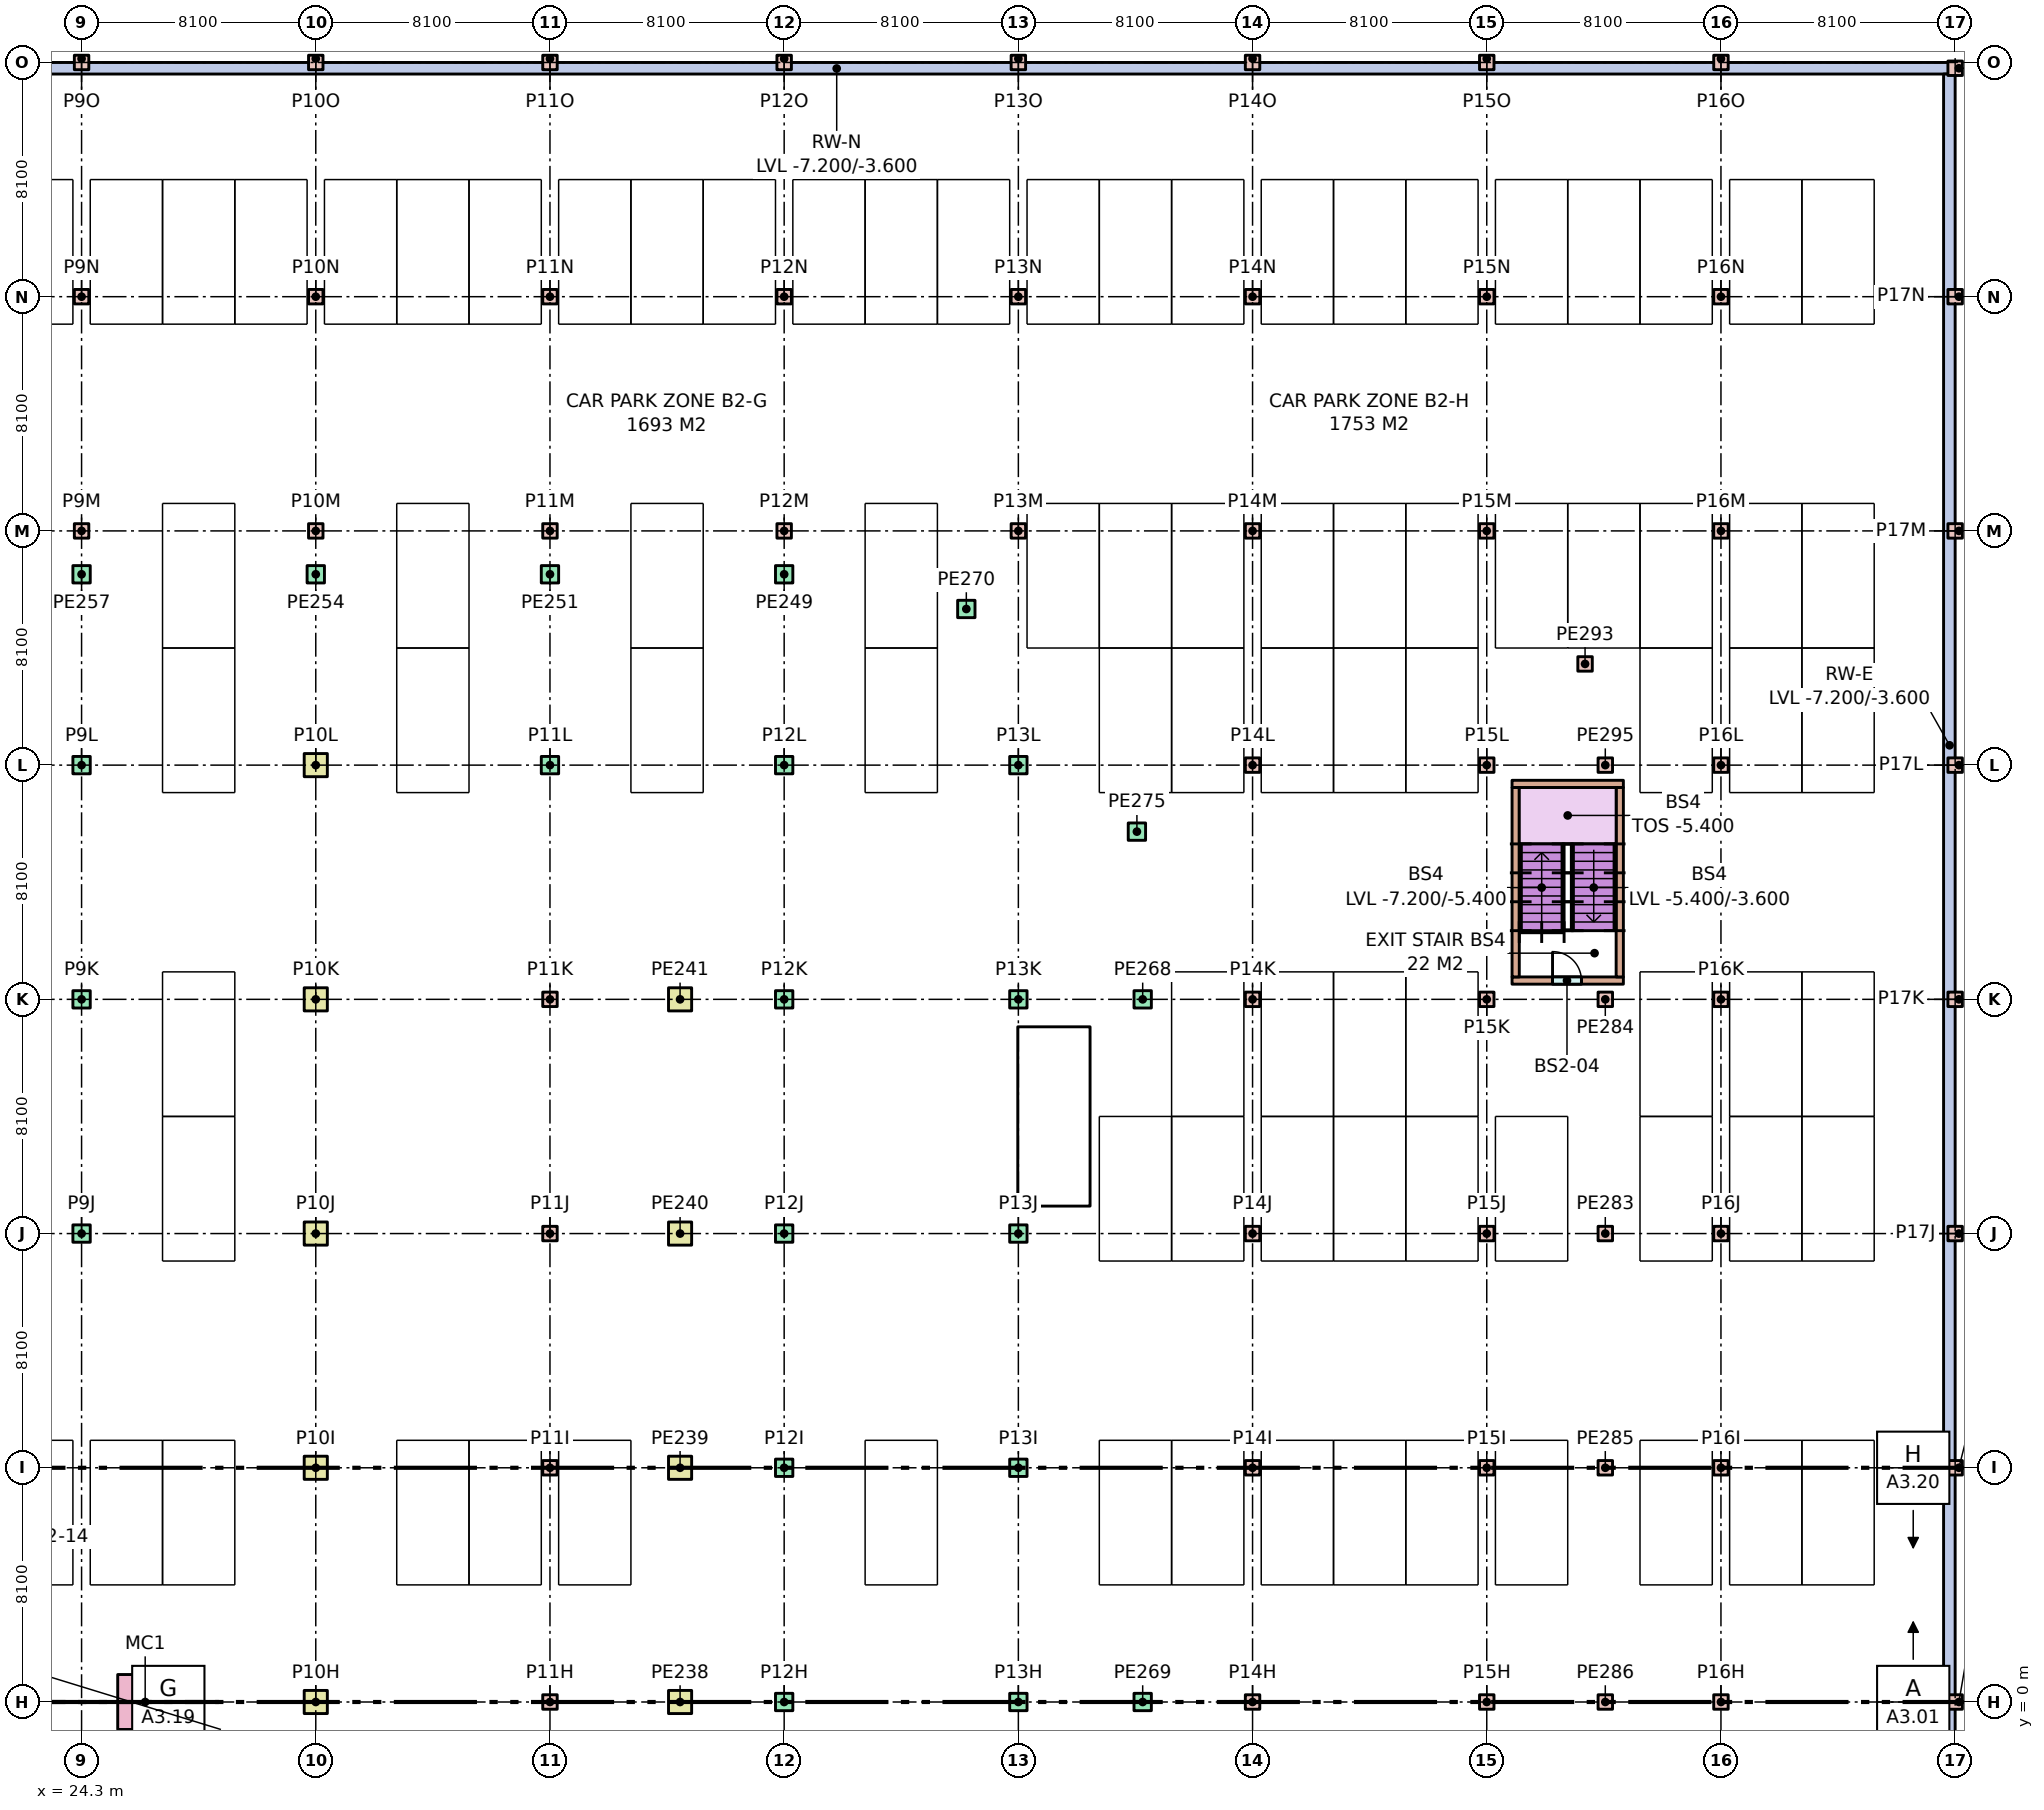
"""IFC4 building model, lengths in metres.
Left out: names, types, materials, properties, quantities, classifications, styles, units other than length and angle.
Written with IfcOpenShell. Run it as: python <this file> out.ifc"""

import sys

from ifc_helpers import new_model, si_unit, direction, frame, frame_2d, origin, origin_2d, place, context, subcontext, project, spatial, rectangle, extrude, element, fill, save


model = new_model("IFC4")
c1 = context("Model", 3, precision=1e-05, world=origin(), true_north=direction((0.0, 1.0)))
c2 = subcontext(c1, "Body", "Model", "MODEL_VIEW")
j1 = project(units=[si_unit("LENGTHUNIT", "METRE"), si_unit("PLANEANGLEUNIT", "RADIAN")], contexts=[c1])
p1 = place(None, origin())
s1 = spatial("IfcSite", under=j1, at=p1, CompositionType="ELEMENT")
p2 = place(p1, origin())
s2 = spatial("IfcBuilding", under=s1, at=p2, CompositionType="ELEMENT")
p3 = place(p2, frame((0.0, 0.0, -7.2)))
s3 = spatial("IfcBuildingStorey", under=s2, at=p3, CompositionType="ELEMENT", Elevation=-7.2)
p4 = place(p3, frame((-40.5, 56.5, 0.0), z_axis=(0.0, 0.0, 1.0), x_axis=(1.0, 0.0, 0.0)))
e1 = element("IfcWall", 1, at=p4, inside=s3, PredefinedType="SOLIDWALL", context=c2, shape_type="SweptSolid", body=[
    extrude(rectangle(XDim=129.6, YDim=0.4, at=frame_2d((64.8, 0.0))), origin(), (0.0, 0.0, 1.0), 3.6),
])
p5 = place(p3, frame((88.9, -56.3, 0.0), z_axis=(0.0, 0.0, 1.0), x_axis=(0.0, 1.0, 0.0)))
e2 = element("IfcWall", 2, at=p5, inside=s3, PredefinedType="SOLIDWALL", context=c2, shape_type="SweptSolid", body=[
    extrude(rectangle(XDim=112.6, YDim=0.4, at=frame_2d((56.3, 0.0))), origin(), (0.0, 0.0, 1.0), 3.6),
])
for number, where, z_axis, x_axis in (
    (3, (24.3, 16.2, 0.0), (0.0, 0.0, 1.0), (1.0, 0.0, 0.0)),
    (4, (24.3, 24.3, 0.0), (0.0, 0.0, 1.0), (1.0, 0.0, 0.0)),
    (5, (24.3, 32.4, 0.0), (0.0, 0.0, 1.0), (1.0, 0.0, 0.0)),
):
    element("IfcColumn", number, at=place(p3, frame(where, z_axis=z_axis, x_axis=x_axis)), inside=s3, PredefinedType="COLUMN", context=c2, shape_type="SweptSolid", body=[
        extrude(rectangle(XDim=0.6, YDim=0.6, at=origin_2d()), origin(), (0.0, 0.0, 1.0), 3.6),
    ])
for number, where, z_axis, x_axis in (
    (6, (24.3, 40.5, 0.0), (0.0, 0.0, 1.0), (1.0, 0.0, 0.0)),
    (7, (24.3, 48.6, 0.0), (0.0, 0.0, 1.0), (1.0, 0.0, 0.0)),
    (8, (24.3, 56.7, 0.0), (0.0, 0.0, 1.0), (1.0, 0.0, 0.0)),
):
    element("IfcColumn", number, at=place(p3, frame(where, z_axis=z_axis, x_axis=x_axis)), inside=s3, PredefinedType="COLUMN", context=c2, shape_type="SweptSolid", body=[
        extrude(rectangle(XDim=0.5, YDim=0.5, at=origin_2d()), origin(), (0.0, 0.0, 1.0), 3.6),
    ])
for number, where, z_axis, x_axis in (
    (9, (32.4, 0.0, 0.0), (0.0, 0.0, 1.0), (1.0, 0.0, 0.0)),
    (10, (32.4, 8.1, 0.0), (0.0, 0.0, 1.0), (1.0, 0.0, 0.0)),
    (11, (32.4, 16.2, 0.0), (0.0, 0.0, 1.0), (1.0, 0.0, 0.0)),
    (12, (32.4, 24.3, 0.0), (0.0, 0.0, 1.0), (1.0, 0.0, 0.0)),
    (13, (32.4, 32.4, 0.0), (0.0, 0.0, 1.0), (1.0, 0.0, 0.0)),
):
    element("IfcColumn", number, at=place(p3, frame(where, z_axis=z_axis, x_axis=x_axis)), inside=s3, PredefinedType="COLUMN", context=c2, shape_type="SweptSolid", body=[
        extrude(rectangle(XDim=0.8, YDim=0.8, at=origin_2d()), origin(), (0.0, 0.0, 1.0), 3.6),
    ])
for number, where, z_axis, x_axis in (
    (14, (32.4, 40.5, 0.0), (0.0, 0.0, 1.0), (1.0, 0.0, 0.0)),
    (15, (32.4, 48.6, 0.0), (0.0, 0.0, 1.0), (1.0, 0.0, 0.0)),
    (16, (32.4, 56.7, 0.0), (0.0, 0.0, 1.0), (1.0, 0.0, 0.0)),
    (17, (40.5, 0.0, 0.0), (0.0, 0.0, 1.0), (1.0, 0.0, 0.0)),
    (18, (40.5, 8.1, 0.0), (0.0, 0.0, 1.0), (1.0, 0.0, 0.0)),
    (19, (40.5, 16.2, 0.0), (0.0, 0.0, 1.0), (1.0, 0.0, 0.0)),
    (20, (40.5, 24.3, 0.0), (0.0, 0.0, 1.0), (1.0, 0.0, 0.0)),
):
    element("IfcColumn", number, at=place(p3, frame(where, z_axis=z_axis, x_axis=x_axis)), inside=s3, PredefinedType="COLUMN", context=c2, shape_type="SweptSolid", body=[
        extrude(rectangle(XDim=0.5, YDim=0.5, at=origin_2d()), origin(), (0.0, 0.0, 1.0), 3.6),
    ])
p6 = place(p3, frame((40.5, 32.4, 0.0), z_axis=(0.0, 0.0, 1.0), x_axis=(1.0, 0.0, 0.0)))
e21 = element("IfcColumn", 21, at=p6, inside=s3, PredefinedType="COLUMN", context=c2, shape_type="SweptSolid", body=[
    extrude(rectangle(XDim=0.6, YDim=0.6, at=origin_2d()), origin(), (0.0, 0.0, 1.0), 3.6),
])
for number, where, z_axis, x_axis in (
    (22, (40.5, 40.5, 0.0), (0.0, 0.0, 1.0), (1.0, 0.0, 0.0)),
    (23, (40.5, 48.6, 0.0), (0.0, 0.0, 1.0), (1.0, 0.0, 0.0)),
    (24, (40.5, 56.7, 0.0), (0.0, 0.0, 1.0), (1.0, 0.0, 0.0)),
):
    element("IfcColumn", number, at=place(p3, frame(where, z_axis=z_axis, x_axis=x_axis)), inside=s3, PredefinedType="COLUMN", context=c2, shape_type="SweptSolid", body=[
        extrude(rectangle(XDim=0.5, YDim=0.5, at=origin_2d()), origin(), (0.0, 0.0, 1.0), 3.6),
    ])
for number, where, z_axis, x_axis in (
    (25, (48.6, 0.0, 0.0), (0.0, 0.0, 1.0), (1.0, 0.0, 0.0)),
    (26, (48.6, 8.1, 0.0), (0.0, 0.0, 1.0), (1.0, 0.0, 0.0)),
    (27, (48.6, 16.2, 0.0), (0.0, 0.0, 1.0), (1.0, 0.0, 0.0)),
    (28, (48.6, 24.3, 0.0), (0.0, 0.0, 1.0), (1.0, 0.0, 0.0)),
    (29, (48.6, 32.4, 0.0), (0.0, 0.0, 1.0), (1.0, 0.0, 0.0)),
):
    element("IfcColumn", number, at=place(p3, frame(where, z_axis=z_axis, x_axis=x_axis)), inside=s3, PredefinedType="COLUMN", context=c2, shape_type="SweptSolid", body=[
        extrude(rectangle(XDim=0.6, YDim=0.6, at=origin_2d()), origin(), (0.0, 0.0, 1.0), 3.6),
    ])
for number, where, z_axis, x_axis in (
    (30, (48.6, 40.5, 0.0), (0.0, 0.0, 1.0), (1.0, 0.0, 0.0)),
    (31, (48.6, 48.6, 0.0), (0.0, 0.0, 1.0), (1.0, 0.0, 0.0)),
    (32, (48.6, 56.7, 0.0), (0.0, 0.0, 1.0), (1.0, 0.0, 0.0)),
):
    element("IfcColumn", number, at=place(p3, frame(where, z_axis=z_axis, x_axis=x_axis)), inside=s3, PredefinedType="COLUMN", context=c2, shape_type="SweptSolid", body=[
        extrude(rectangle(XDim=0.5, YDim=0.5, at=origin_2d()), origin(), (0.0, 0.0, 1.0), 3.6),
    ])
for number, where, z_axis, x_axis in (
    (33, (56.7, 0.0, 0.0), (0.0, 0.0, 1.0), (1.0, 0.0, 0.0)),
    (34, (56.7, 8.1, 0.0), (0.0, 0.0, 1.0), (1.0, 0.0, 0.0)),
    (35, (56.7, 16.2, 0.0), (0.0, 0.0, 1.0), (1.0, 0.0, 0.0)),
    (36, (56.7, 24.3, 0.0), (0.0, 0.0, 1.0), (1.0, 0.0, 0.0)),
    (37, (56.7, 32.4, 0.0), (0.0, 0.0, 1.0), (1.0, 0.0, 0.0)),
):
    element("IfcColumn", number, at=place(p3, frame(where, z_axis=z_axis, x_axis=x_axis)), inside=s3, PredefinedType="COLUMN", context=c2, shape_type="SweptSolid", body=[
        extrude(rectangle(XDim=0.6, YDim=0.6, at=origin_2d()), origin(), (0.0, 0.0, 1.0), 3.6),
    ])
for number, where, z_axis, x_axis in (
    (38, (56.7, 40.5, 0.0), (0.0, 0.0, 1.0), (1.0, 0.0, 0.0)),
    (39, (56.7, 48.6, 0.0), (0.0, 0.0, 1.0), (1.0, 0.0, 0.0)),
    (40, (56.7, 56.7, 0.0), (0.0, 0.0, 1.0), (1.0, 0.0, 0.0)),
    (41, (64.8, 0.0, 0.0), (0.0, 0.0, 1.0), (1.0, 0.0, 0.0)),
    (42, (64.8, 8.1, 0.0), (0.0, 0.0, 1.0), (1.0, 0.0, 0.0)),
    (43, (64.8, 16.2, 0.0), (0.0, 0.0, 1.0), (1.0, 0.0, 0.0)),
    (44, (64.8, 24.3, 0.0), (0.0, 0.0, 1.0), (1.0, 0.0, 0.0)),
    (45, (64.8, 32.4, 0.0), (0.0, 0.0, 1.0), (1.0, 0.0, 0.0)),
    (46, (64.8, 40.5, 0.0), (0.0, 0.0, 1.0), (1.0, 0.0, 0.0)),
    (47, (64.8, 48.6, 0.0), (0.0, 0.0, 1.0), (1.0, 0.0, 0.0)),
    (48, (64.8, 56.7, 0.0), (0.0, 0.0, 1.0), (1.0, 0.0, 0.0)),
    (49, (72.9, 0.0, 0.0), (0.0, 0.0, 1.0), (1.0, 0.0, 0.0)),
    (50, (72.9, 8.1, 0.0), (0.0, 0.0, 1.0), (1.0, 0.0, 0.0)),
    (51, (72.9, 16.2, 0.0), (0.0, 0.0, 1.0), (1.0, 0.0, 0.0)),
    (52, (72.9, 24.3, 0.0), (0.0, 0.0, 1.0), (1.0, 0.0, 0.0)),
    (53, (72.9, 32.4, 0.0), (0.0, 0.0, 1.0), (1.0, 0.0, 0.0)),
    (54, (72.9, 40.5, 0.0), (0.0, 0.0, 1.0), (1.0, 0.0, 0.0)),
    (55, (72.9, 48.6, 0.0), (0.0, 0.0, 1.0), (1.0, 0.0, 0.0)),
    (56, (72.9, 56.7, 0.0), (0.0, 0.0, 1.0), (1.0, 0.0, 0.0)),
    (57, (81.0, 0.0, 0.0), (0.0, 0.0, 1.0), (1.0, 0.0, 0.0)),
    (58, (81.0, 8.1, 0.0), (0.0, 0.0, 1.0), (1.0, 0.0, 0.0)),
    (59, (81.0, 16.2, 0.0), (0.0, 0.0, 1.0), (1.0, 0.0, 0.0)),
    (60, (81.0, 24.3, 0.0), (0.0, 0.0, 1.0), (1.0, 0.0, 0.0)),
    (61, (81.0, 32.4, 0.0), (0.0, 0.0, 1.0), (1.0, 0.0, 0.0)),
    (62, (81.0, 40.5, 0.0), (0.0, 0.0, 1.0), (1.0, 0.0, 0.0)),
    (63, (81.0, 48.6, 0.0), (0.0, 0.0, 1.0), (1.0, 0.0, 0.0)),
    (64, (81.0, 56.7, 0.0), (0.0, 0.0, 1.0), (1.0, 0.0, 0.0)),
    (65, (89.1, 0.0, 0.0), (0.0, 0.0, 1.0), (1.0, 0.0, 0.0)),
    (66, (89.1, 8.1, 0.0), (0.0, 0.0, 1.0), (1.0, 0.0, 0.0)),
    (67, (89.1, 16.2, 0.0), (0.0, 0.0, 1.0), (1.0, 0.0, 0.0)),
    (68, (89.1, 24.3, 0.0), (0.0, 0.0, 1.0), (1.0, 0.0, 0.0)),
    (69, (89.1, 32.4, 0.0), (0.0, 0.0, 1.0), (1.0, 0.0, 0.0)),
    (70, (89.1, 40.5, 0.0), (0.0, 0.0, 1.0), (1.0, 0.0, 0.0)),
    (71, (89.1, 48.6, 0.0), (0.0, 0.0, 1.0), (1.0, 0.0, 0.0)),
    (72, (89.1, 56.5, 0.0), (0.0, 0.0, 1.0), (1.0, 0.0, 0.0)),
):
    element("IfcColumn", number, at=place(p3, frame(where, z_axis=z_axis, x_axis=x_axis)), inside=s3, PredefinedType="COLUMN", context=c2, shape_type="SweptSolid", body=[
        extrude(rectangle(XDim=0.5, YDim=0.5, at=origin_2d()), origin(), (0.0, 0.0, 1.0), 3.6),
    ])
for number, where, z_axis, x_axis in (
    (73, (45.0, 0.0, 0.0), (0.0, 0.0, 1.0), (1.0, 0.0, 0.0)),
    (74, (45.0, 8.1, 0.0), (0.0, 0.0, 1.0), (1.0, 0.0, 0.0)),
    (75, (45.0, 16.2, 0.0), (0.0, 0.0, 1.0), (1.0, 0.0, 0.0)),
    (76, (45.0, 24.3, 0.0), (0.0, 0.0, 1.0), (1.0, 0.0, 0.0)),
):
    element("IfcColumn", number, at=place(p3, frame(where, z_axis=z_axis, x_axis=x_axis)), inside=s3, PredefinedType="COLUMN", context=c2, shape_type="SweptSolid", body=[
        extrude(rectangle(XDim=0.8, YDim=0.8, at=origin_2d()), origin(), (0.0, 0.0, 1.0), 3.6),
    ])
for number, where, z_axis, x_axis in (
    (77, (48.6, 39.0, 0.0), (0.0, 0.0, 1.0), (1.0, 0.0, 0.0)),
    (78, (40.5, 39.0, 0.0), (0.0, 0.0, 1.0), (1.0, 0.0, 0.0)),
    (79, (32.4, 39.0, 0.0), (0.0, 0.0, 1.0), (1.0, 0.0, 0.0)),
    (80, (24.3, 39.0, 0.0), (0.0, 0.0, 1.0), (1.0, 0.0, 0.0)),
    (81, (61.0, 24.3, 0.0), (0.0, 0.0, 1.0), (1.0, 0.0, 0.0)),
    (82, (61.0, 0.0, 0.0), (0.0, 0.0, 1.0), (1.0, 0.0, 0.0)),
    (83, (54.9, 37.8, 0.0), (0.0, 0.0, 1.0), (1.0, 0.0, 0.0)),
    (84, (60.8, 30.1, 0.0), (0.0, 0.0, 1.0), (1.0, 0.0, 0.0)),
):
    element("IfcColumn", number, at=place(p3, frame(where, z_axis=z_axis, x_axis=x_axis)), inside=s3, PredefinedType="COLUMN", context=c2, shape_type="SweptSolid", body=[
        extrude(rectangle(XDim=0.6, YDim=0.6, at=origin_2d()), origin(), (0.0, 0.0, 1.0), 3.6),
    ])
for number, where, z_axis, x_axis in (
    (85, (77.0, 16.2, 0.0), (0.0, 0.0, 1.0), (1.0, 0.0, 0.0)),
    (86, (77.0, 24.3, 0.0), (0.0, 0.0, 1.0), (1.0, 0.0, 0.0)),
    (87, (77.0, 8.1, 0.0), (0.0, 0.0, 1.0), (1.0, 0.0, 0.0)),
    (88, (77.0, 0.0, 0.0), (0.0, 0.0, 1.0), (1.0, 0.0, 0.0)),
    (89, (76.3, 35.9, 0.0), (0.0, 0.0, 1.0), (1.0, 0.0, 0.0)),
    (90, (77.0, 32.4, 0.0), (0.0, 0.0, 1.0), (1.0, 0.0, 0.0)),
):
    element("IfcColumn", number, at=place(p3, frame(where, z_axis=z_axis, x_axis=x_axis)), inside=s3, PredefinedType="COLUMN", context=c2, shape_type="SweptSolid", body=[
        extrude(rectangle(XDim=0.5, YDim=0.5, at=origin_2d()), origin(), (0.0, 0.0, 1.0), 3.6),
    ])
p7 = place(p3, frame((26.5, 0.0, 0.0), z_axis=(0.0, 0.0, 1.0), x_axis=(0.0, 1.0, 0.0)))
e91 = element("IfcColumn", 91, at=p7, inside=s3, PredefinedType="COLUMN", context=c2, shape_type="SweptSolid", body=[
    extrude(rectangle(XDim=1.9, YDim=1.9, at=origin_2d()), origin(), (0.0, 0.0, 1.0), 3.6),
])
p8 = place(p3, frame((73.775, 24.95, 0.0), z_axis=(0.0, 0.0, 1.0), x_axis=(1.0, 0.0, 0.0)))
e92 = element("IfcWall", 92, at=p8, inside=s3, PredefinedType="STANDARD", context=c2, shape_type="SweptSolid", body=[
    extrude(rectangle(XDim=3.85, YDim=0.25, at=frame_2d((1.925, 0.0))), origin(), (0.0, 0.0, 1.0), 3.28),
])
p9 = place(p8, frame((1.4, 0.0, 0.0)))
e93 = element("IfcOpeningElement", 93, at=p9, cuts=e92, PredefinedType="OPENING", context=c2, shape_type="SweptSolid", body=[
    extrude(rectangle(XDim=1.0, YDim=2.1, at=frame_2d((0.5, 1.05))), frame((0.0, 0.135, 0.0), z_axis=(0.0, -1.0, 0.0), x_axis=(1.0, 0.0, 0.0)), (0.0, 0.0, 1.0), 0.27),
])
p10 = place(p3, frame((73.775, 31.75, 0.0), z_axis=(0.0, 0.0, 1.0), x_axis=(1.0, 0.0, 0.0)))
e94 = element("IfcWall", 94, at=p10, inside=s3, PredefinedType="STANDARD", context=c2, shape_type="SweptSolid", body=[
    extrude(rectangle(XDim=3.85, YDim=0.25, at=frame_2d((1.925, 0.0))), origin(), (0.0, 0.0, 1.0), 3.28),
])
for number, where, z_axis, x_axis in (
    (95, (73.9, 25.075, 0.0), (0.0, 0.0, 1.0), (0.0, 1.0, 0.0)),
    (96, (77.5, 25.075, 0.0), (0.0, 0.0, 1.0), (0.0, 1.0, 0.0)),
):
    element("IfcWall", number, at=place(p3, frame(where, z_axis=z_axis, x_axis=x_axis)), inside=s3, PredefinedType="STANDARD", context=c2, shape_type="SweptSolid", body=[
        extrude(rectangle(XDim=6.55, YDim=0.25, at=frame_2d((3.275, 0.0))), origin(), (0.0, 0.0, 1.0), 3.28),
    ])
p11 = place(p9, origin())
e97 = element("IfcDoor", 97, at=p11, inside=s3, OperationType="SINGLE_SWING_LEFT", PredefinedType="DOOR", context=c2, shape_type="SweptSolid", body=[
    extrude(rectangle(XDim=1.0, YDim=2.1, at=frame_2d((0.5, 1.05))), frame((0.0, 0.025, 0.0), z_axis=(0.0, -1.0, 0.0), x_axis=(1.0, 0.0, 0.0)), (0.0, 0.0, 1.0), 0.05),
])
fill(e93, e97)
save(model, sys.argv[1])
